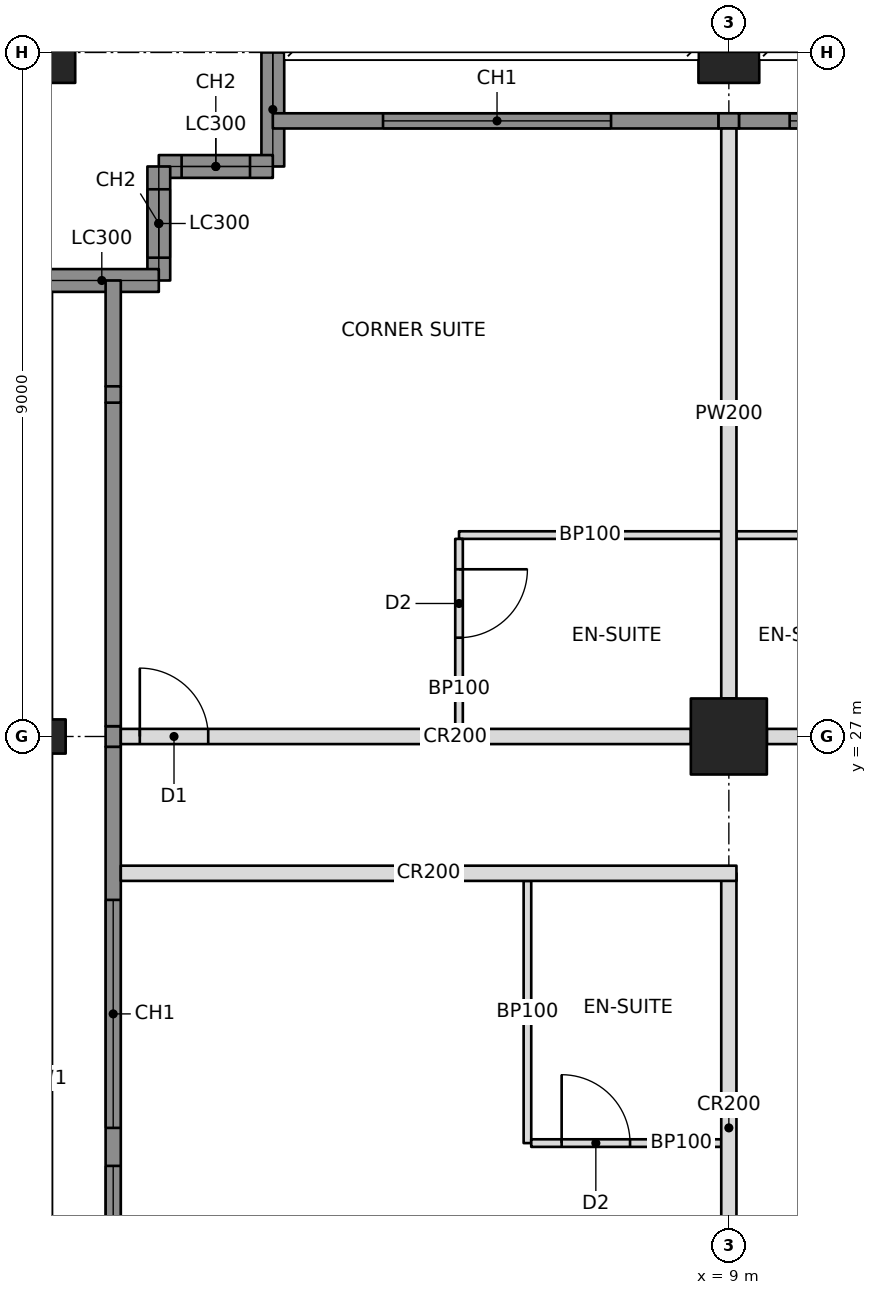
"""IFC4 building model, lengths in metres.
Left out: names, types, materials, properties, quantities, classifications, styles, units other than length and angle.
Written with IfcOpenShell. Run it as: python <this file> out.ifc"""

import sys

from ifc_helpers import new_model, si_unit, direction, frame, frame_2d, origin, origin_2d, place, context, subcontext, project, spatial, rectangle, hollow_rectangle, i_section, extrude, element, fill, save


model = new_model("IFC4")
c1 = context("Model", 3, precision=1e-05, world=origin(), true_north=direction((0.0, 1.0)))
c2 = subcontext(c1, "Body", "Model", "MODEL_VIEW")
j1 = project(units=[si_unit("LENGTHUNIT", "METRE"), si_unit("PLANEANGLEUNIT", "RADIAN")], contexts=[c1])
p1 = place(None, origin())
s1 = spatial("IfcSite", under=j1, at=p1, CompositionType="ELEMENT")
p2 = place(p1, origin())
s2 = spatial("IfcBuilding", under=s1, at=p2, CompositionType="ELEMENT")
p3 = place(p2, frame((0.0, 0.0, 97.6)))
s3 = spatial("IfcBuildingStorey", under=s2, at=p3, CompositionType="ELEMENT", Elevation=97.6)
p4 = place(p3, frame((0.0, 27.0, 0.0), z_axis=(0.0, 0.0, 1.0), x_axis=(0.0, 1.0, 0.0)))
e1 = element("IfcColumn", 1, at=p4, inside=s3, PredefinedType="COLUMN", context=c2, shape_type="SweptSolid", body=[
    extrude(i_section(OverallWidth=0.449, OverallDepth=0.549, WebThickness=0.072, FlangeThickness=0.115, at=origin_2d()), origin(), (0.0, 0.0, 1.0), 3.4),
])
p5 = place(p3, frame((0.0, 36.0, 0.0), z_axis=(0.0, 0.0, 1.0), x_axis=(1.0, 0.0, 0.0)))
e2 = element("IfcColumn", 2, at=p5, inside=s3, PredefinedType="COLUMN", context=c2, shape_type="SweptSolid", body=[
    extrude(hollow_rectangle(XDim=0.8, YDim=0.8, WallThickness=0.07, at=origin_2d()), origin(), (0.0, 0.0, 1.0), 3.4),
])
p6 = place(p3, frame((9.0, 27.0, 0.0), z_axis=(0.0, 0.0, 1.0), x_axis=(1.0, 0.0, 0.0)))
e3 = element("IfcColumn", 3, at=p6, inside=s3, PredefinedType="COLUMN", context=c2, shape_type="SweptSolid", body=[
    extrude(hollow_rectangle(XDim=1.0, YDim=1.0, WallThickness=0.1, at=origin_2d()), origin(), (0.0, 0.0, 1.0), 3.4),
])
p7 = place(p3, frame((9.0, 36.0, 0.0), z_axis=(0.0, 0.0, 1.0), x_axis=(1.0, 0.0, 0.0)))
e4 = element("IfcColumn", 4, at=p7, inside=s3, PredefinedType="COLUMN", context=c2, shape_type="SweptSolid", body=[
    extrude(hollow_rectangle(XDim=0.8, YDim=0.8, WallThickness=0.07, at=origin_2d()), origin(), (0.0, 0.0, 1.0), 3.4),
])
p8 = place(p3, frame((3.0, 36.0, 0.0), z_axis=(0.0, 0.0, 1.0), x_axis=(0.0, -1.0, 0.0)))
e5 = element("IfcWall", 5, at=p8, inside=s3, PredefinedType="SOLIDWALL", context=c2, shape_type="SweptSolid", body=[
    extrude(rectangle(XDim=1.5, YDim=0.3, at=frame_2d((0.75, 0.0))), origin(), (0.0, 0.0, 1.0), 2.42),
])
p9 = place(p3, frame((3.0, 34.5, 0.0), z_axis=(0.0, 0.0, 1.0), x_axis=(-1.0, 0.0, 0.0)))
e6 = element("IfcWall", 6, at=p9, inside=s3, PredefinedType="SOLIDWALL", context=c2, shape_type="SweptSolid", body=[
    extrude(rectangle(XDim=1.5, YDim=0.3, at=frame_2d((0.75, 0.0))), origin(), (0.0, 0.0, 1.0), 3.2),
])
p10 = place(p9, frame((0.3, 0.0, 0.6)))
e7 = element("IfcOpeningElement", 7, at=p10, cuts=e6, PredefinedType="OPENING", context=c2, shape_type="SweptSolid", body=[
    extrude(rectangle(XDim=0.9, YDim=2.2, at=frame_2d((0.45, 1.1))), frame((0.0, 0.16, 0.0), z_axis=(0.0, -1.0, 0.0), x_axis=(1.0, 0.0, 0.0)), (0.0, 0.0, 1.0), 0.32),
])
p11 = place(p3, frame((1.5, 34.5, 0.0), z_axis=(0.0, 0.0, 1.0), x_axis=(0.0, -1.0, 0.0)))
e8 = element("IfcWall", 8, at=p11, inside=s3, PredefinedType="SOLIDWALL", context=c2, shape_type="SweptSolid", body=[
    extrude(rectangle(XDim=1.5, YDim=0.3, at=frame_2d((0.75, 0.0))), origin(), (0.0, 0.0, 1.0), 3.2),
])
p12 = place(p11, frame((0.3, 0.0, 0.6)))
e9 = element("IfcOpeningElement", 9, at=p12, cuts=e8, PredefinedType="OPENING", context=c2, shape_type="SweptSolid", body=[
    extrude(rectangle(XDim=0.9, YDim=2.2, at=frame_2d((0.45, 1.1))), frame((0.0, 0.16, 0.0), z_axis=(0.0, -1.0, 0.0), x_axis=(1.0, 0.0, 0.0)), (0.0, 0.0, 1.0), 0.32),
])
p13 = place(p3, frame((1.5, 33.0, 0.0), z_axis=(0.0, 0.0, 1.0), x_axis=(-1.0, 0.0, 0.0)))
e10 = element("IfcWall", 10, at=p13, inside=s3, PredefinedType="SOLIDWALL", context=c2, shape_type="SweptSolid", body=[
    extrude(rectangle(XDim=1.5, YDim=0.3, at=frame_2d((0.75, 0.0))), origin(), (0.0, 0.0, 1.0), 2.42),
])
p14 = place(p3, frame((3.0, 35.1, 0.0), z_axis=(0.0, 0.0, 1.0), x_axis=(1.0, 0.0, 0.0)))
e11 = element("IfcWall", 11, at=p14, inside=s3, PredefinedType="SOLIDWALL", context=c2, shape_type="SweptSolid", body=[
    extrude(rectangle(XDim=5.865, YDim=0.2, at=frame_2d((2.932, 0.0))), origin(), (0.0, 0.0, 1.0), 3.2),
])
p15 = place(p14, frame((1.45, 0.0, 0.6)))
e12 = element("IfcOpeningElement", 12, at=p15, cuts=e11, PredefinedType="OPENING", context=c2, shape_type="SweptSolid", body=[
    extrude(rectangle(XDim=3.0, YDim=2.2, at=frame_2d((1.5, 1.1))), frame((0.0, 0.11, 0.0), z_axis=(0.0, -1.0, 0.0), x_axis=(1.0, 0.0, 0.0)), (0.0, 0.0, 1.0), 0.22),
])
p16 = place(p3, frame((1.0, 27.0, 0.0), z_axis=(0.0, 0.0, 1.0), x_axis=(1.0, 0.0, 0.0)))
e13 = element("IfcWall", 13, at=p16, inside=s3, PredefinedType="PARTITIONING", context=c2, shape_type="SweptSolid", body=[
    extrude(rectangle(XDim=7.5, YDim=0.2, at=frame_2d((3.75, 0.0))), origin(), (0.0, 0.0, 1.0), 2.438),
])
p17 = place(p16, frame((0.25, 0.0, 0.0)))
e14 = element("IfcOpeningElement", 14, at=p17, cuts=e13, PredefinedType="OPENING", context=c2, shape_type="SweptSolid", body=[
    extrude(rectangle(XDim=0.9, YDim=2.1, at=frame_2d((0.45, 1.05))), frame((0.0, 0.11, 0.0), z_axis=(0.0, -1.0, 0.0), x_axis=(1.0, 0.0, 0.0)), (0.0, 0.0, 1.0), 0.22),
])
p18 = place(p3, frame((9.5, 27.0, 0.0), z_axis=(0.0, 0.0, 1.0), x_axis=(1.0, 0.0, 0.0)))
e15 = element("IfcWall", 15, at=p18, inside=s3, PredefinedType="PARTITIONING", context=c2, shape_type="SweptSolid", body=[
    extrude(rectangle(XDim=8.0, YDim=0.2, at=frame_2d((4.0, 0.0))), origin(), (0.0, 0.0, 1.0), 2.405),
])
p19 = place(p18, frame((2.85, 0.0, 0.0)))
e16 = element("IfcOpeningElement", 16, at=p19, cuts=e15, PredefinedType="OPENING", context=c2, shape_type="SweptSolid", body=[
    extrude(rectangle(XDim=0.9, YDim=2.1, at=frame_2d((0.45, 1.05))), frame((0.0, 0.11, 0.0), z_axis=(0.0, -1.0, 0.0), x_axis=(1.0, 0.0, 0.0)), (0.0, 0.0, 1.0), 0.22),
])
p20 = place(p18, frame((4.25, 0.0, 0.0)))
e17 = element("IfcOpeningElement", 17, at=p20, cuts=e15, PredefinedType="OPENING", context=c2, shape_type="SweptSolid", body=[
    extrude(rectangle(XDim=0.9, YDim=2.1, at=frame_2d((0.45, 1.05))), frame((0.0, 0.11, 0.0), z_axis=(0.0, -1.0, 0.0), x_axis=(1.0, 0.0, 0.0)), (0.0, 0.0, 1.0), 0.22),
])
p21 = place(p3, frame((9.0, 18.5, 0.0), z_axis=(0.0, 0.0, 1.0), x_axis=(0.0, 1.0, 0.0)))
e18 = element("IfcWall", 18, at=p21, inside=s3, PredefinedType="PARTITIONING", context=c2, shape_type="SweptSolid", body=[
    extrude(rectangle(XDim=6.7, YDim=0.2, at=frame_2d((3.35, 0.0))), origin(), (0.0, 0.0, 1.0), 2.405),
])
p22 = place(p3, frame((1.0, 25.2, 0.0), z_axis=(0.0, 0.0, 1.0), x_axis=(1.0, 0.0, 0.0)))
e19 = element("IfcWall", 19, at=p22, inside=s3, PredefinedType="PARTITIONING", context=c2, shape_type="SweptSolid", body=[
    extrude(rectangle(XDim=8.1, YDim=0.2, at=frame_2d((4.05, 0.0))), origin(), (0.0, 0.0, 1.0), 2.404),
])
p23 = place(p3, frame((9.0, 27.5, 0.0), z_axis=(0.0, 0.0, 1.0), x_axis=(0.0, 1.0, 0.0)))
e20 = element("IfcWall", 20, at=p23, inside=s3, PredefinedType="PARTITIONING", context=c2, shape_type="SweptSolid", body=[
    extrude(rectangle(XDim=7.5, YDim=0.2, at=frame_2d((3.75, 0.0))), origin(), (0.0, 0.0, 1.0), 2.438),
])
p24 = place(p3, frame((5.45, 29.65, 0.0), z_axis=(0.0, 0.0, 1.0), x_axis=(1.0, 0.0, 0.0)))
e21 = element("IfcWall", 21, at=p24, inside=s3, PredefinedType="PARTITIONING", context=c2, shape_type="SweptSolid", body=[
    extrude(rectangle(XDim=3.45, YDim=0.1, at=frame_2d((1.725, 0.0))), origin(), (0.0, 0.0, 1.0), 2.438),
])
p25 = place(p3, frame((5.45, 27.1, 0.0), z_axis=(0.0, 0.0, 1.0), x_axis=(0.0, 1.0, 0.0)))
e22 = element("IfcWall", 22, at=p25, inside=s3, PredefinedType="PARTITIONING", context=c2, shape_type="SweptSolid", body=[
    extrude(rectangle(XDim=2.5, YDim=0.1, at=frame_2d((1.25, 0.0))), origin(), (0.0, 0.0, 1.0), 2.438),
])
p26 = place(p25, frame((1.2, 0.0, 0.0)))
e23 = element("IfcOpeningElement", 23, at=p26, cuts=e22, PredefinedType="OPENING", context=c2, shape_type="SweptSolid", body=[
    extrude(rectangle(XDim=0.9, YDim=2.1, at=frame_2d((0.45, 1.05))), frame((0.0, 0.06, 0.0), z_axis=(0.0, -1.0, 0.0), x_axis=(1.0, 0.0, 0.0)), (0.0, 0.0, 1.0), 0.12),
])
p27 = place(p3, frame((9.1, 29.65, 0.0), z_axis=(0.0, 0.0, 1.0), x_axis=(1.0, 0.0, 0.0)))
e24 = element("IfcWall", 24, at=p27, inside=s3, PredefinedType="PARTITIONING", context=c2, shape_type="SweptSolid", body=[
    extrude(rectangle(XDim=2.95, YDim=0.1, at=frame_2d((1.475, 0.0))), origin(), (0.0, 0.0, 1.0), 2.438),
])
p28 = place(p3, frame((6.35, 21.65, 0.0), z_axis=(0.0, 0.0, 1.0), x_axis=(0.0, 1.0, 0.0)))
e25 = element("IfcWall", 25, at=p28, inside=s3, PredefinedType="PARTITIONING", context=c2, shape_type="SweptSolid", body=[
    extrude(rectangle(XDim=3.45, YDim=0.1, at=frame_2d((1.725, 0.0))), origin(), (0.0, 0.0, 1.0), 3.2),
])
p29 = place(p3, frame((8.9, 21.65, 0.0), z_axis=(0.0, 0.0, 1.0), x_axis=(-1.0, 0.0, 0.0)))
e26 = element("IfcWall", 26, at=p29, inside=s3, PredefinedType="PARTITIONING", context=c2, shape_type="SweptSolid", body=[
    extrude(rectangle(XDim=2.5, YDim=0.1, at=frame_2d((1.25, 0.0))), origin(), (0.0, 0.0, 1.0), 2.404),
])
p30 = place(p29, frame((1.2, 0.0, 0.0)))
e27 = element("IfcOpeningElement", 27, at=p30, cuts=e26, PredefinedType="OPENING", context=c2, shape_type="SweptSolid", body=[
    extrude(rectangle(XDim=0.9, YDim=2.1, at=frame_2d((0.45, 1.05))), frame((0.0, 0.06, 0.0), z_axis=(0.0, -1.0, 0.0), x_axis=(1.0, 0.0, 0.0)), (0.0, 0.0, 1.0), 0.12),
])
p31 = place(p3, frame((0.9, 18.194, 0.0), z_axis=(0.0, 0.0, 1.0), x_axis=(0.0, 1.0, 0.0)))
e28 = element("IfcWall", 28, at=p31, inside=s3, PredefinedType="SOLIDWALL", context=c2, shape_type="SweptSolid", body=[
    extrude(rectangle(XDim=8.671, YDim=0.2, at=frame_2d((4.335, 0.0))), origin(), (0.0, 0.0, 1.0), 3.2),
])
p32 = place(p31, frame((0.156, 0.0, 0.6)))
e29 = element("IfcOpeningElement", 29, at=p32, cuts=e28, PredefinedType="OPENING", context=c2, shape_type="SweptSolid", body=[
    extrude(rectangle(XDim=3.0, YDim=2.2, at=frame_2d((1.5, 1.1))), frame((0.0, 0.11, 0.0), z_axis=(0.0, -1.0, 0.0), x_axis=(1.0, 0.0, 0.0)), (0.0, 0.0, 1.0), 0.22),
])
p33 = place(p31, frame((3.656, 0.0, 0.6)))
e30 = element("IfcOpeningElement", 30, at=p33, cuts=e28, PredefinedType="OPENING", context=c2, shape_type="SweptSolid", body=[
    extrude(rectangle(XDim=3.0, YDim=2.2, at=frame_2d((1.5, 1.1))), frame((0.0, 0.11, 0.0), z_axis=(0.0, -1.0, 0.0), x_axis=(1.0, 0.0, 0.0)), (0.0, 0.0, 1.0), 0.22),
])
p34 = place(p3, frame((0.9, 26.865, 0.0), z_axis=(0.0, 0.0, 1.0), x_axis=(0.0, 1.0, 0.0)))
e31 = element("IfcWall", 31, at=p34, inside=s3, PredefinedType="SOLIDWALL", context=c2, shape_type="SweptSolid", body=[
    extrude(rectangle(XDim=0.271, YDim=0.2, at=frame_2d((0.135, 0.0))), origin(), (0.0, 0.0, 1.0), 2.438),
])
p35 = place(p3, frame((0.9, 27.135, 0.0), z_axis=(0.0, 0.0, 1.0), x_axis=(0.0, 1.0, 0.0)))
e32 = element("IfcWall", 32, at=p35, inside=s3, PredefinedType="SOLIDWALL", context=c2, shape_type="SweptSolid", body=[
    extrude(rectangle(XDim=4.257, YDim=0.2, at=frame_2d((2.129, 0.0))), origin(), (0.0, 0.0, 1.0), 3.2),
])
p36 = place(p3, frame((0.9, 31.393, 0.0), z_axis=(0.0, 0.0, 1.0), x_axis=(0.0, 1.0, 0.0)))
e33 = element("IfcWall", 33, at=p36, inside=s3, PredefinedType="SOLIDWALL", context=c2, shape_type="SweptSolid", body=[
    extrude(rectangle(XDim=0.215, YDim=0.2, at=frame_2d((0.107, 0.0))), origin(), (0.0, 0.0, 1.0), 2.661),
])
p37 = place(p3, frame((0.9, 31.607, 0.0), z_axis=(0.0, 0.0, 1.0), x_axis=(0.0, 1.0, 0.0)))
e34 = element("IfcWall", 34, at=p37, inside=s3, PredefinedType="SOLIDWALL", context=c2, shape_type="SweptSolid", body=[
    extrude(rectangle(XDim=1.393, YDim=0.2, at=frame_2d((0.696, 0.0))), origin(), (0.0, 0.0, 1.0), 3.2),
])
p38 = place(p3, frame((8.865, 35.1, 0.0), z_axis=(0.0, 0.0, 1.0), x_axis=(1.0, 0.0, 0.0)))
e35 = element("IfcWall", 35, at=p38, inside=s3, PredefinedType="SOLIDWALL", context=c2, shape_type="SweptSolid", body=[
    extrude(rectangle(XDim=0.271, YDim=0.2, at=frame_2d((0.135, 0.0))), origin(), (0.0, 0.0, 1.0), 2.438),
])
p39 = place(p3, frame((9.135, 35.1, 0.0), z_axis=(0.0, 0.0, 1.0), x_axis=(1.0, 0.0, 0.0)))
e36 = element("IfcWall", 36, at=p39, inside=s3, PredefinedType="SOLIDWALL", context=c2, shape_type="SweptSolid", body=[
    extrude(rectangle(XDim=8.671, YDim=0.2, at=frame_2d((4.335, 0.0))), origin(), (0.0, 0.0, 1.0), 3.2),
])
p40 = place(p39, frame((0.665, 0.0, 0.6)))
e37 = element("IfcOpeningElement", 37, at=p40, cuts=e36, PredefinedType="OPENING", context=c2, shape_type="SweptSolid", body=[
    extrude(rectangle(XDim=3.0, YDim=2.2, at=frame_2d((1.5, 1.1))), frame((0.0, 0.11, 0.0), z_axis=(0.0, -1.0, 0.0), x_axis=(1.0, 0.0, 0.0)), (0.0, 0.0, 1.0), 0.22),
])
p41 = place(p39, frame((5.065, 0.0, 0.6)))
e38 = element("IfcOpeningElement", 38, at=p41, cuts=e36, PredefinedType="OPENING", context=c2, shape_type="SweptSolid", body=[
    extrude(rectangle(XDim=3.0, YDim=2.2, at=frame_2d((1.5, 1.1))), frame((0.0, 0.11, 0.0), z_axis=(0.0, -1.0, 0.0), x_axis=(1.0, 0.0, 0.0)), (0.0, 0.0, 1.0), 0.22),
])
p42 = place(p10, origin())
e39 = element("IfcWindow", 39, at=p42, inside=s3, PartitioningType="SINGLE_PANEL", PredefinedType="WINDOW", context=c2, shape_type="SweptSolid", body=[
    extrude(rectangle(XDim=0.9, YDim=2.2, at=frame_2d((0.45, 1.1))), frame((0.0, 0.03, 0.0), z_axis=(0.0, -1.0, 0.0), x_axis=(1.0, 0.0, 0.0)), (0.0, 0.0, 1.0), 0.06),
])
fill(e7, e39)
p43 = place(p12, origin())
e40 = element("IfcWindow", 40, at=p43, inside=s3, PartitioningType="SINGLE_PANEL", PredefinedType="WINDOW", context=c2, shape_type="SweptSolid", body=[
    extrude(rectangle(XDim=0.9, YDim=2.2, at=frame_2d((0.45, 1.1))), frame((0.0, 0.03, 0.0), z_axis=(0.0, -1.0, 0.0), x_axis=(1.0, 0.0, 0.0)), (0.0, 0.0, 1.0), 0.06),
])
fill(e9, e40)
p44 = place(p15, origin())
e41 = element("IfcWindow", 41, at=p44, inside=s3, PartitioningType="TRIPLE_PANEL_VERTICAL", PredefinedType="WINDOW", context=c2, shape_type="SweptSolid", body=[
    extrude(rectangle(XDim=3.0, YDim=2.2, at=frame_2d((1.5, 1.1))), frame((0.0, 0.03, 0.0), z_axis=(0.0, -1.0, 0.0), x_axis=(1.0, 0.0, 0.0)), (0.0, 0.0, 1.0), 0.06),
])
fill(e12, e41)
p45 = place(p40, origin())
e42 = element("IfcWindow", 42, at=p45, inside=s3, PartitioningType="TRIPLE_PANEL_VERTICAL", PredefinedType="WINDOW", context=c2, shape_type="SweptSolid", body=[
    extrude(rectangle(XDim=3.0, YDim=2.2, at=frame_2d((1.5, 1.1))), frame((0.0, 0.03, 0.0), z_axis=(0.0, -1.0, 0.0), x_axis=(1.0, 0.0, 0.0)), (0.0, 0.0, 1.0), 0.06),
])
fill(e37, e42)
p46 = place(p32, origin())
e43 = element("IfcWindow", 43, at=p46, inside=s3, PartitioningType="TRIPLE_PANEL_VERTICAL", PredefinedType="WINDOW", context=c2, shape_type="SweptSolid", body=[
    extrude(rectangle(XDim=3.0, YDim=2.2, at=frame_2d((1.5, 1.1))), frame((0.0, 0.03, 0.0), z_axis=(0.0, -1.0, 0.0), x_axis=(1.0, 0.0, 0.0)), (0.0, 0.0, 1.0), 0.06),
])
fill(e29, e43)
p47 = place(p33, origin())
e44 = element("IfcWindow", 44, at=p47, inside=s3, PartitioningType="TRIPLE_PANEL_VERTICAL", PredefinedType="WINDOW", context=c2, shape_type="SweptSolid", body=[
    extrude(rectangle(XDim=3.0, YDim=2.2, at=frame_2d((1.5, 1.1))), frame((0.0, 0.03, 0.0), z_axis=(0.0, -1.0, 0.0), x_axis=(1.0, 0.0, 0.0)), (0.0, 0.0, 1.0), 0.06),
])
fill(e30, e44)
p48 = place(p26, frame((0.9, 0.0, 0.0), z_axis=(0.0, 0.0, 1.0), x_axis=(-1.0, 0.0, 0.0)))
e45 = element("IfcDoor", 45, at=p48, inside=s3, OperationType="SINGLE_SWING_LEFT", PredefinedType="DOOR", context=c2, shape_type="SweptSolid", body=[
    extrude(rectangle(XDim=0.9, YDim=2.1, at=frame_2d((0.45, 1.05))), frame((0.0, 0.025, 0.0), z_axis=(0.0, -1.0, 0.0), x_axis=(1.0, 0.0, 0.0)), (0.0, 0.0, 1.0), 0.05),
])
fill(e23, e45)
p49 = place(p17, origin())
e46 = element("IfcDoor", 46, at=p49, inside=s3, OperationType="SINGLE_SWING_LEFT", PredefinedType="DOOR", context=c2, shape_type="SweptSolid", body=[
    extrude(rectangle(XDim=0.9, YDim=2.1, at=frame_2d((0.45, 1.05))), frame((0.0, 0.025, 0.0), z_axis=(0.0, -1.0, 0.0), x_axis=(1.0, 0.0, 0.0)), (0.0, 0.0, 1.0), 0.05),
])
fill(e14, e46)
p50 = place(p30, frame((0.9, 0.0, 0.0), z_axis=(0.0, 0.0, 1.0), x_axis=(-1.0, 0.0, 0.0)))
e47 = element("IfcDoor", 47, at=p50, inside=s3, OperationType="SINGLE_SWING_LEFT", PredefinedType="DOOR", context=c2, shape_type="SweptSolid", body=[
    extrude(rectangle(XDim=0.9, YDim=2.1, at=frame_2d((0.45, 1.05))), frame((0.0, 0.025, 0.0), z_axis=(0.0, -1.0, 0.0), x_axis=(1.0, 0.0, 0.0)), (0.0, 0.0, 1.0), 0.05),
])
fill(e27, e47)
save(model, sys.argv[1])
